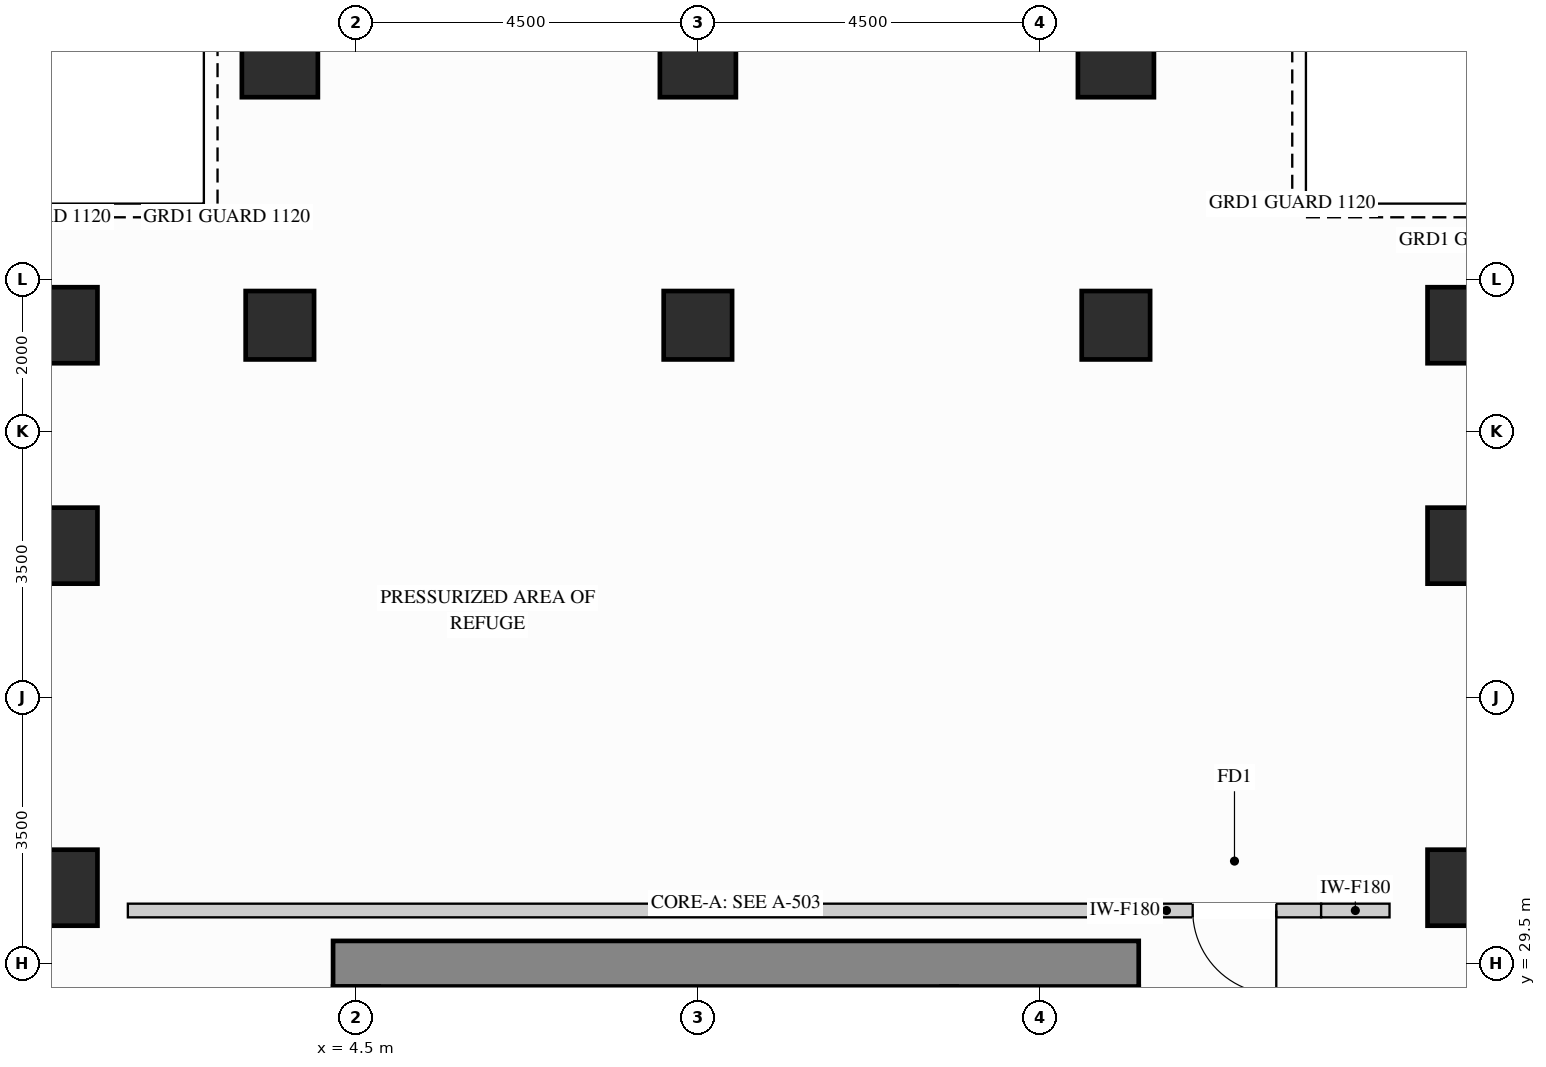
"""IFC4 building model, lengths in metres.
Left out: names, types, materials, properties, quantities, classifications, styles, units other than length and angle.
Written with IfcOpenShell. Run it as: python <this file> out.ifc"""

import sys

from ifc_helpers import new_model, si_unit, direction, frame, frame_2d, origin, origin_2d, place, context, subcontext, project, spatial, rectangle, extrude, source, transform, mapped, element, fill, save


model = new_model("IFC4")
c1 = context("Model", 3, precision=1e-05, world=origin(), true_north=direction((0.0, 1.0)))
c2 = subcontext(c1, "Body", "Model", "MODEL_VIEW")
j1 = project(units=[si_unit("LENGTHUNIT", "METRE"), si_unit("PLANEANGLEUNIT", "RADIAN")], contexts=[c1])
p1 = place(None, origin())
s1 = spatial("IfcSite", under=j1, at=p1, CompositionType="ELEMENT")
p2 = place(p1, origin())
s2 = spatial("IfcBuilding", under=s1, at=p2, CompositionType="ELEMENT")
p3 = place(p2, frame((0.0, 0.0, 207.9)))
s3 = spatial("IfcBuildingStorey", under=s2, at=p3, CompositionType="ELEMENT", Elevation=207.9)
m1 = source(origin(), c2, "Body", "SweptSolid", [
    extrude(rectangle(XDim=0.9, YDim=0.9, at=origin_2d()), origin(), (0.0, 0.0, 1.0), 4.26),
])
for number, where, z_axis, x_axis in (
    (1, (14.5, 37.9, 0.0), (0.0, 0.0, 1.0), (1.0, 0.0, 0.0)),
    (2, (3.5, 37.9, 0.0), (0.0, 0.0, 1.0), (1.0, 0.0, 0.0)),
    (3, (9.0, 37.9, 0.0), (0.0, 0.0, 1.0), (1.0, 0.0, 0.0)),
):
    element("IfcColumn", number, at=place(p3, frame(where, z_axis=z_axis, x_axis=x_axis)), inside=s3, PredefinedType="COLUMN", context=c2, shape_type="MappedRepresentation", body=[
        mapped(m1, transform((0.0, 0.0, 0.0), x_axis=(1.0, 0.0, 0.0), y_axis=(0.0, 1.0, 0.0), z_axis=(0.0, 0.0, 1.0))),
    ])
m2 = source(origin(), c2, "Body", "SweptSolid", [
    extrude(rectangle(XDim=0.8, YDim=1.0, at=origin_2d()), origin(), (0.0, 0.0, 1.0), 4.26),
])
for number, where, z_axis, x_axis in (
    (4, (19.0, 30.5, 0.0), (0.0, 0.0, 1.0), (1.0, 0.0, 0.0)),
    (5, (19.0, 35.0, 0.0), (0.0, 0.0, 1.0), (1.0, 0.0, 0.0)),
    (6, (19.0, 37.9, 0.0), (0.0, 0.0, 1.0), (1.0, 0.0, 0.0)),
):
    element("IfcColumn", number, at=place(p3, frame(where, z_axis=z_axis, x_axis=x_axis)), inside=s3, PredefinedType="COLUMN", context=c2, shape_type="MappedRepresentation", body=[
        mapped(m2, transform((0.0, 0.0, 0.0), x_axis=(1.0, 0.0, 0.0), y_axis=(0.0, 1.0, 0.0), z_axis=(0.0, 0.0, 1.0))),
    ])
m3 = source(origin(), c2, "Body", "SweptSolid", [
    extrude(rectangle(XDim=1.0, YDim=1.0, at=origin_2d()), origin(), (0.0, 0.0, 1.0), 4.26),
])
for number, where, z_axis, x_axis in (
    (7, (14.5, 41.4, 0.0), (0.0, 0.0, 1.0), (1.0, 0.0, 0.0)),
    (8, (3.5, 41.4, 0.0), (0.0, 0.0, 1.0), (1.0, 0.0, 0.0)),
    (9, (9.0, 41.4, 0.0), (0.0, 0.0, 1.0), (1.0, 0.0, 0.0)),
    (10, (0.6, 30.5, 0.0), (0.0, 0.0, 1.0), (1.0, 0.0, 0.0)),
    (11, (0.6, 35.0, 0.0), (0.0, 0.0, 1.0), (1.0, 0.0, 0.0)),
    (12, (0.6, 37.9, 0.0), (0.0, 0.0, 1.0), (1.0, 0.0, 0.0)),
):
    element("IfcColumn", number, at=place(p3, frame(where, z_axis=z_axis, x_axis=x_axis)), inside=s3, PredefinedType="COLUMN", context=c2, shape_type="MappedRepresentation", body=[
        mapped(m3, transform((0.0, 0.0, 0.0), x_axis=(1.0, 0.0, 0.0), y_axis=(0.0, 1.0, 0.0), z_axis=(0.0, 0.0, 1.0))),
    ])
m4 = source(origin(), c2, "Body", "SweptSolid", [
    extrude(rectangle(XDim=8.32, YDim=0.6, at=frame_2d((4.16, 0.0))), origin(), (0.0, 0.0, 1.0), 4.26),
])
p4 = place(p3, frame((14.5, 20.88, 0.0), z_axis=(0.0, 0.0, 1.0), x_axis=(0.0, 1.0, 0.0)))
e13 = element("IfcWall", 13, at=p4, inside=s3, PredefinedType="SHEAR", context=c2, shape_type="MappedRepresentation", body=[
    mapped(m4, transform((0.0, 0.0, 0.0), x_axis=(1.0, 0.0, 0.0), y_axis=(0.0, 1.0, 0.0), z_axis=(0.0, 0.0, 1.0))),
])
m5 = source(origin(), c2, "Body", "SweptSolid", [
    extrude(rectangle(XDim=10.6, YDim=0.6, at=frame_2d((5.3, 0.0))), origin(), (0.0, 0.0, 1.0), 4.26),
])
p5 = place(p3, frame((4.2, 29.5, 0.0), z_axis=(0.0, 0.0, 1.0), x_axis=(1.0, 0.0, 0.0)))
e14 = element("IfcWall", 14, at=p5, inside=s3, PredefinedType="SHEAR", context=c2, shape_type="MappedRepresentation", body=[
    mapped(m5, transform((0.0, 0.0, 0.0), x_axis=(1.0, 0.0, 0.0), y_axis=(0.0, 1.0, 0.0), z_axis=(0.0, 0.0, 1.0))),
])
p6 = place(p3, frame((14.92, 30.2, 0.0), z_axis=(0.0, 0.0, 1.0), x_axis=(1.0, 0.0, 0.0)))
e15 = element("IfcWall", 15, at=p6, inside=s3, PredefinedType="PARTITIONING", context=c2, shape_type="SweptSolid", body=[
    extrude(rectangle(XDim=2.28, YDim=0.18, at=frame_2d((1.14, 0.0))), origin(), (0.0, 0.0, 1.0), 4.245),
])
p7 = place(p6, frame((0.59, 0.0, 0.0)))
e16 = element("IfcOpeningElement", 16, at=p7, cuts=e15, PredefinedType="OPENING", context=c2, shape_type="SweptSolid", body=[
    extrude(rectangle(XDim=1.1, YDim=2.15, at=frame_2d((0.55, 1.075))), frame((0.0, 0.1, 0.0), z_axis=(0.0, -1.0, 0.0), x_axis=(1.0, 0.0, 0.0)), (0.0, 0.0, 1.0), 0.2),
])
m6 = source(origin(), c2, "Body", "SweptSolid", [
    extrude(rectangle(XDim=13.42, YDim=0.18, at=frame_2d((6.71, 0.0))), origin(), (0.0, 0.0, 1.0), 4.245),
])
p8 = place(p3, frame((1.5, 30.2, 0.0), z_axis=(0.0, 0.0, 1.0), x_axis=(1.0, 0.0, 0.0)))
e17 = element("IfcWall", 17, at=p8, inside=s3, PredefinedType="PARTITIONING", context=c2, shape_type="MappedRepresentation", body=[
    mapped(m6, transform((0.0, 0.0, 0.0), x_axis=(1.0, 0.0, 0.0), y_axis=(0.0, 1.0, 0.0), z_axis=(0.0, 0.0, 1.0))),
])
m7 = source(origin(), c2, "Body", "SweptSolid", [
    extrude(rectangle(XDim=0.9, YDim=0.18, at=frame_2d((0.45, 0.0))), origin(), (0.0, 0.0, 1.0), 4.245),
])
p9 = place(p3, frame((17.2, 30.2, 0.0), z_axis=(0.0, 0.0, 1.0), x_axis=(1.0, 0.0, 0.0)))
e18 = element("IfcWall", 18, at=p9, inside=s3, PredefinedType="PARTITIONING", context=c2, shape_type="MappedRepresentation", body=[
    mapped(m7, transform((0.0, 0.0, 0.0), x_axis=(1.0, 0.0, 0.0), y_axis=(0.0, 1.0, 0.0), z_axis=(0.0, 0.0, 1.0))),
])
m8 = source(origin(), c2, "Body", "SweptSolid", [
    extrude(rectangle(XDim=1.1, YDim=2.15, at=frame_2d((0.55, 1.075))), frame((0.0, 0.025, 0.0), z_axis=(0.0, -1.0, 0.0), x_axis=(1.0, 0.0, 0.0)), (0.0, 0.0, 1.0), 0.05),
])
p10 = place(p7, origin())
e19 = element("IfcDoor", 19, at=p10, inside=s3, OperationType="SINGLE_SWING_RIGHT", PredefinedType="DOOR", context=c2, shape_type="MappedRepresentation", body=[
    mapped(m8, transform((0.0, 0.0, 0.0), x_axis=(1.0, 0.0, 0.0), y_axis=(0.0, 1.0, 0.0), z_axis=(0.0, 0.0, 1.0))),
])
fill(e16, e19)
save(model, sys.argv[1])
